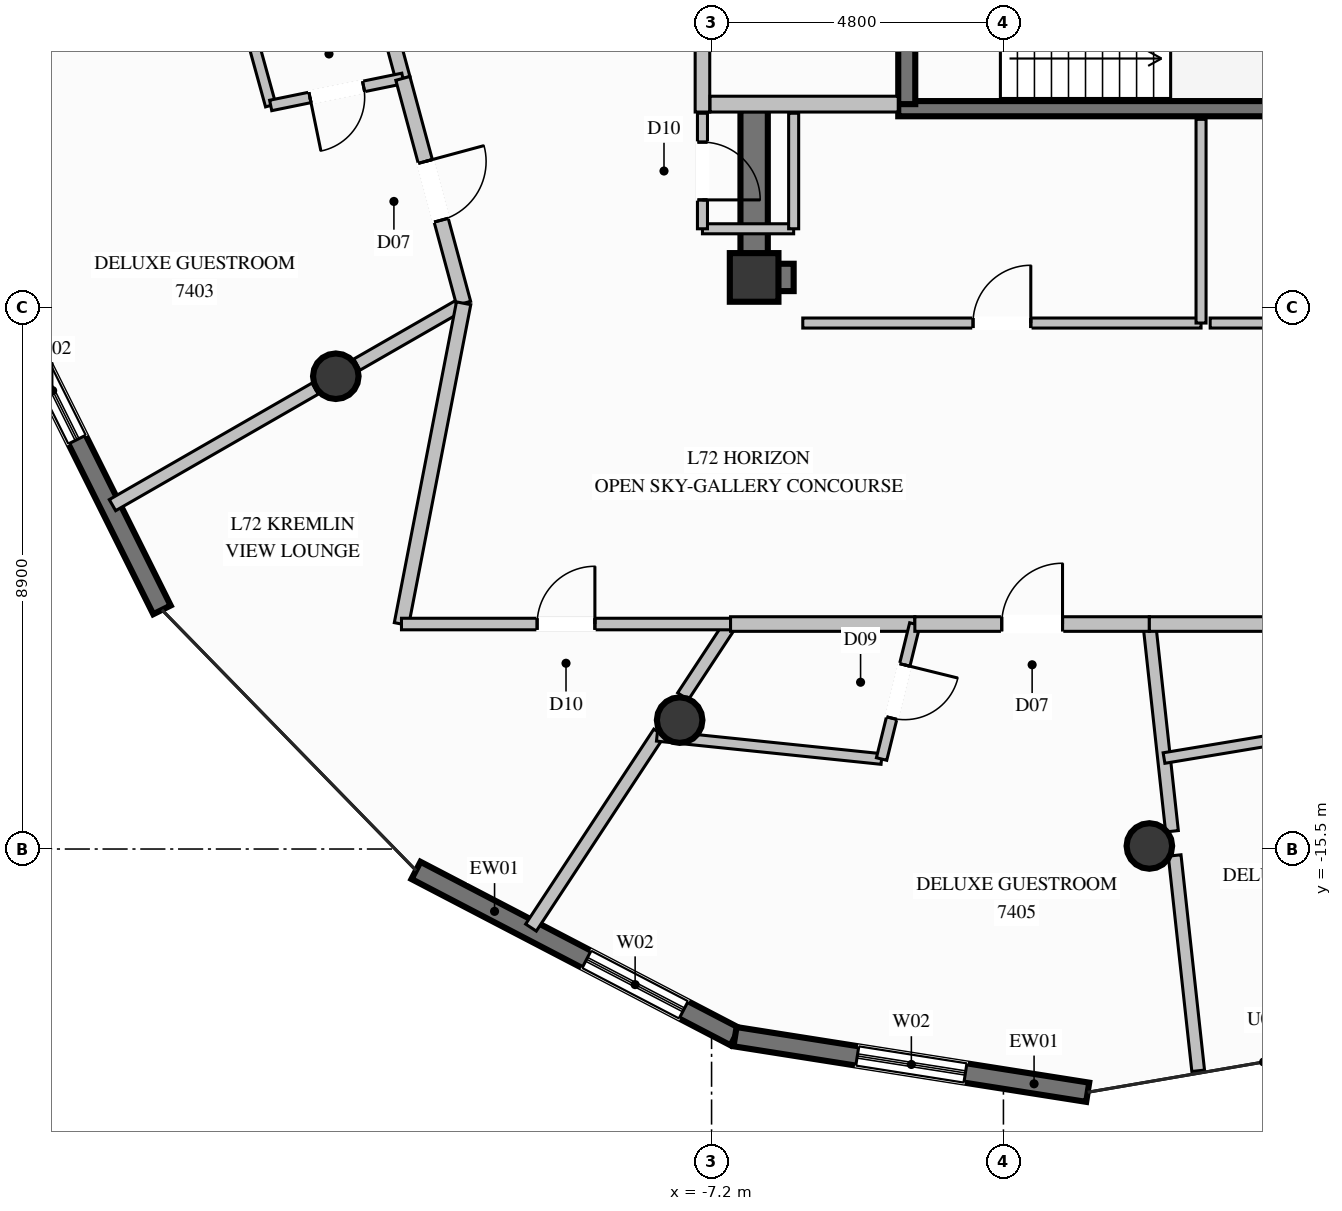
"""IFC4 building model, lengths in metres.
Left out: names, types, materials, properties, quantities, classifications, styles, units other than length and angle.
Written with IfcOpenShell. Run it as: python <this file> out.ifc"""

import sys

from ifc_helpers import new_model, si_unit, direction, frame, frame_2d, origin, origin_2d, place, context, subcontext, project, spatial, rectangle, circle, extrude, element, fill, save


model = new_model("IFC4")
c1 = context("Model", 3, precision=1e-05, world=origin(), true_north=direction((0.0, 1.0)))
c2 = subcontext(c1, "Body", "Model", "MODEL_VIEW")
j1 = project(units=[si_unit("LENGTHUNIT", "METRE"), si_unit("PLANEANGLEUNIT", "RADIAN")], contexts=[c1])
p1 = place(None, origin())
s1 = spatial("IfcSite", under=j1, at=p1, CompositionType="ELEMENT")
p2 = place(p1, origin())
s2 = spatial("IfcBuilding", under=s1, at=p2, CompositionType="ELEMENT")
p3 = place(p2, frame((0.0, 0.0, 278.2)))
s3 = spatial("IfcBuildingStorey", under=s2, at=p3, CompositionType="ELEMENT", Elevation=278.2)
p4 = place(p3, frame((-6.5, -6.1, 0.0), z_axis=(0.0, 0.0, 1.0), x_axis=(1.0, 0.0, 0.0)))
e1 = element("IfcColumn", 1, at=p4, inside=s3, PredefinedType="COLUMN", context=c2, shape_type="SweptSolid", body=[
    extrude(rectangle(XDim=0.8, YDim=0.8, at=origin_2d()), origin(), (0.0, 0.0, 1.0), 3.8),
])
p5 = place(p3, frame((-4.13, -3.325, 0.0), z_axis=(0.0, 0.0, 1.0), x_axis=(1.0, 0.0, 0.0)))
e2 = element("IfcWall", 2, at=p5, inside=s3, PredefinedType="SOLIDWALL", context=c2, shape_type="SweptSolid", body=[
    extrude(rectangle(XDim=8.26, YDim=0.25, at=frame_2d((4.13, 0.0))), origin(), (0.0, 0.0, 1.0), 3.8),
])
p6 = place(p3, frame((-6.275, -6.1, 0.0), z_axis=(0.0, 0.0, 1.0), x_axis=(1.0, 0.0, 0.0)))
e3 = element("IfcWall", 3, at=p6, inside=s3, PredefinedType="SHEAR", context=c2, shape_type="SweptSolid", body=[
    extrude(rectangle(XDim=0.425, YDim=0.45, at=frame_2d((0.212, 0.0))), origin(), (0.0, 0.0, 1.0), 3.8),
])
p7 = place(p3, frame((-6.5, -6.325, 0.0), z_axis=(0.0, 0.0, 1.0), x_axis=(0.0, 1.0, 0.0)))
e4 = element("IfcWall", 4, at=p7, inside=s3, PredefinedType="SHEAR", context=c2, shape_type="SweptSolid", body=[
    extrude(rectangle(XDim=2.975, YDim=0.45, at=frame_2d((1.487, 0.0))), origin(), (0.0, 0.0, 1.0), 3.8),
])
for number, where, z_axis, x_axis in (
    (5, (-13.38, -7.725, 0.0), (0.0, 0.0, 1.0), (1.0, 0.0, 0.0)),
    (6, (-7.725, -13.38, 0.0), (0.0, 0.0, 1.0), (1.0, 0.0, 0.0)),
    (7, (0.0, -15.45, 0.0), (0.0, 0.0, 1.0), (1.0, 0.0, 0.0)),
):
    element("IfcColumn", number, at=place(p3, frame(where, z_axis=z_axis, x_axis=x_axis)), inside=s3, PredefinedType="COLUMN", context=c2, shape_type="SweptSolid", body=[
        extrude(circle(Radius=0.375, at=origin_2d()), origin(), (0.0, 0.0, 1.0), 3.8),
    ])
p8 = place(p3, frame((-16.239, -11.567, 0.0), z_axis=(0.0, 0.0, 1.0), x_axis=(-0.44621303713, 0.894926771024, 0.0)))
e8 = element("IfcWall", 8, at=p8, inside=s3, PredefinedType="SOLIDWALL", context=c2, shape_type="SweptSolid", body=[
    extrude(rectangle(XDim=6.053, YDim=0.32, at=frame_2d((3.026, 0.0))), origin(), (0.0, 0.0, 1.0), 3.57),
])
p9 = place(p8, frame((3.129, 0.0, 0.35)))
e9 = element("IfcOpeningElement", 9, at=p9, cuts=e8, PredefinedType="OPENING", context=c2, shape_type="SweptSolid", body=[
    extrude(rectangle(XDim=1.8, YDim=2.6, at=frame_2d((0.9, 1.3))), frame((0.0, 0.17, 0.0), z_axis=(0.0, -1.0, 0.0), x_axis=(1.0, 0.0, 0.0)), (0.0, 0.0, 1.0), 0.34),
])
p10 = place(p3, frame((-6.814, -18.586, 0.0), z_axis=(0.0, 0.0, 1.0), x_axis=(-0.886842224504, 0.462072363205, 0.0)))
e10 = element("IfcWall", 10, at=p10, inside=s3, PredefinedType="SOLIDWALL", context=c2, shape_type="SweptSolid", body=[
    extrude(rectangle(XDim=5.917, YDim=0.32, at=frame_2d((2.958, 0.0))), origin(), (0.0, 0.0, 1.0), 3.57),
])
p11 = place(p10, frame((0.953, 0.0, 0.35)))
e11 = element("IfcOpeningElement", 11, at=p11, cuts=e10, PredefinedType="OPENING", context=c2, shape_type="SweptSolid", body=[
    extrude(rectangle(XDim=1.8, YDim=2.6, at=frame_2d((0.9, 1.3))), frame((0.0, 0.17, 0.0), z_axis=(0.0, -1.0, 0.0), x_axis=(1.0, 0.0, 0.0)), (0.0, 0.0, 1.0), 0.34),
])
p12 = place(p3, frame((-1.014, -19.5, 0.0), z_axis=(0.0, 0.0, 1.0), x_axis=(-0.987808436163, 0.155674318516, 0.0)))
e12 = element("IfcWall", 12, at=p12, inside=s3, PredefinedType="SOLIDWALL", context=c2, shape_type="SweptSolid", body=[
    extrude(rectangle(XDim=5.872, YDim=0.32, at=frame_2d((2.936, 0.0))), origin(), (0.0, 0.0, 1.0), 3.57),
])
p13 = place(p12, frame((2.036, 0.0, 0.35)))
e13 = element("IfcOpeningElement", 13, at=p13, cuts=e12, PredefinedType="OPENING", context=c2, shape_type="SweptSolid", body=[
    extrude(rectangle(XDim=1.8, YDim=2.6, at=frame_2d((0.9, 1.3))), frame((0.0, 0.17, 0.0), z_axis=(0.0, -1.0, 0.0), x_axis=(1.0, 0.0, 0.0)), (0.0, 0.0, 1.0), 0.34),
])
p14 = place(p3, frame((-3.99, -3.25, 0.0), z_axis=(0.0, 0.0, 1.0), x_axis=(0.0, 1.0, 0.0)))
e14 = element("IfcWall", 14, at=p14, inside=s3, PredefinedType="SOLIDWALL", context=c2, shape_type="SweptSolid", body=[
    extrude(rectangle(XDim=5.46, YDim=0.28, at=frame_2d((2.73, 0.0))), origin(), (0.0, 0.0, 1.0), 3.57),
])
p15 = place(p14, frame((0.937, 0.0, 0.0)))
e15 = element("IfcOpeningElement", 15, at=p15, cuts=e14, PredefinedType="OPENING", context=c2, shape_type="SweptSolid", body=[
    extrude(rectangle(XDim=1.2, YDim=2.2, at=frame_2d((0.6, 1.1))), frame((0.0, 0.15, 0.0), z_axis=(0.0, -1.0, 0.0), x_axis=(1.0, 0.0, 0.0)), (0.0, 0.0, 1.0), 0.3),
])
p16 = place(p3, frame((-7.35, -3.38, 0.0), z_axis=(0.0, 0.0, 1.0), x_axis=(0.0, 1.0, 0.0)))
e16 = element("IfcWall", 16, at=p16, inside=s3, PredefinedType="PARTITIONING", context=c2, shape_type="SweptSolid", body=[
    extrude(rectangle(XDim=5.72, YDim=0.24, at=frame_2d((2.86, 0.0))), origin(), (0.0, 0.0, 1.0), 2.655),
])
p17 = place(p16, frame((1.599, 0.0, 0.0)))
e17 = element("IfcOpeningElement", 17, at=p17, cuts=e16, PredefinedType="OPENING", context=c2, shape_type="SweptSolid", body=[
    extrude(rectangle(XDim=1.15, YDim=2.2, at=frame_2d((0.575, 1.1))), frame((0.0, 0.13, 0.0), z_axis=(0.0, -1.0, 0.0), x_axis=(1.0, 0.0, 0.0)), (0.0, 0.0, 1.0), 0.26),
])
p18 = place(p3, frame((-7.225, -3.25, 0.0), z_axis=(0.0, 0.0, 1.0), x_axis=(1.0, 0.0, 0.0)))
e18 = element("IfcWall", 18, at=p18, inside=s3, PredefinedType="PARTITIONING", context=c2, shape_type="SweptSolid", body=[
    extrude(rectangle(XDim=3.095, YDim=0.26, at=frame_2d((1.548, 0.0))), origin(), (0.0, 0.0, 1.0), 3.57),
])
p19 = place(p3, frame((-7.35, -5.3, 0.0), z_axis=(0.0, 0.0, 1.0), x_axis=(1.0, 0.0, 0.0)))
e19 = element("IfcWall", 19, at=p19, inside=s3, PredefinedType="PARTITIONING", context=c2, shape_type="SweptSolid", body=[
    extrude(rectangle(XDim=1.5, YDim=0.165, at=frame_2d((0.75, 0.0))), origin(), (0.0, 0.0, 1.0), 2.655),
])
p20 = place(p3, frame((-5.85, -5.3, 0.0), z_axis=(0.0, 0.0, 1.0), x_axis=(0.0, 1.0, 0.0)))
e20 = element("IfcWall", 20, at=p20, inside=s3, PredefinedType="PARTITIONING", context=c2, shape_type="SweptSolid", body=[
    extrude(rectangle(XDim=1.9, YDim=0.165, at=frame_2d((0.95, 0.0))), origin(), (0.0, 0.0, 1.0), 2.655),
])
p21 = place(p3, frame((-7.35, -3.4, 0.0), z_axis=(0.0, 0.0, 1.0), x_axis=(0.0, -1.0, 0.0)))
e21 = element("IfcWall", 21, at=p21, inside=s3, PredefinedType="PARTITIONING", context=c2, shape_type="SweptSolid", body=[
    extrude(rectangle(XDim=1.9, YDim=0.165, at=frame_2d((0.95, 0.0))), origin(), (0.0, 0.0, 1.0), 3.57),
])
p22 = place(p21, frame((0.475, 0.0, 0.0)))
e22 = element("IfcOpeningElement", 22, at=p22, cuts=e21, PredefinedType="OPENING", context=c2, shape_type="SweptSolid", body=[
    extrude(rectangle(XDim=0.95, YDim=2.1, at=frame_2d((0.475, 1.05))), frame((0.0, 0.093, 0.0), z_axis=(0.0, -1.0, 0.0), x_axis=(1.0, 0.0, 0.0)), (0.0, 0.0, 1.0), 0.185),
])
p23 = place(p3, frame((-5.7, -6.85, 0.0), z_axis=(0.0, 0.0, 1.0), x_axis=(1.0, 0.0, 0.0)))
e23 = element("IfcWall", 23, at=p23, inside=s3, PredefinedType="PARTITIONING", context=c2, shape_type="SweptSolid", body=[
    extrude(rectangle(XDim=6.55, YDim=0.165, at=frame_2d((3.275, 0.0))), origin(), (0.0, 0.0, 1.0), 2.655),
])
p24 = place(p23, frame((2.8, 0.0, 0.0)))
e24 = element("IfcOpeningElement", 24, at=p24, cuts=e23, PredefinedType="OPENING", context=c2, shape_type="SweptSolid", body=[
    extrude(rectangle(XDim=0.95, YDim=2.1, at=frame_2d((0.475, 1.05))), frame((0.0, 0.093, 0.0), z_axis=(0.0, -1.0, 0.0), x_axis=(1.0, 0.0, 0.0)), (0.0, 0.0, 1.0), 0.185),
])
p25 = place(p3, frame((0.85, -6.85, 0.0), z_axis=(0.0, 0.0, 1.0), x_axis=(0.0, 1.0, 0.0)))
e25 = element("IfcWall", 25, at=p25, inside=s3, PredefinedType="PARTITIONING", context=c2, shape_type="SweptSolid", body=[
    extrude(rectangle(XDim=3.35, YDim=0.165, at=frame_2d((1.675, 0.0))), origin(), (0.0, 0.0, 1.0), 3.57),
])
p26 = place(p3, frame((1.0, -6.85, 0.0), z_axis=(0.0, 0.0, 1.0), x_axis=(1.0, 0.0, 0.0)))
e26 = element("IfcWall", 26, at=p26, inside=s3, PredefinedType="PARTITIONING", context=c2, shape_type="SweptSolid", body=[
    extrude(rectangle(XDim=2.95, YDim=0.165, at=frame_2d((1.475, 0.0))), origin(), (0.0, 0.0, 1.0), 2.655),
])
p27 = place(p26, frame((0.95, 0.0, 0.0)))
e27 = element("IfcOpeningElement", 27, at=p27, cuts=e26, PredefinedType="OPENING", context=c2, shape_type="SweptSolid", body=[
    extrude(rectangle(XDim=1.05, YDim=2.15, at=frame_2d((0.525, 1.075))), frame((0.0, 0.093, 0.0), z_axis=(0.0, -1.0, 0.0), x_axis=(1.0, 0.0, 0.0)), (0.0, 0.0, 1.0), 0.185),
])
p28 = place(p3, frame((-11.278, -6.525, 0.0), z_axis=(0.0, 0.0, 1.0), x_axis=(-0.86703130414, -0.498253667966, 0.0)))
e28 = element("IfcWall", 28, at=p28, inside=s3, PredefinedType="PARTITIONING", context=c2, shape_type="SweptSolid", body=[
    extrude(rectangle(XDim=2.025, YDim=0.21, at=frame_2d((1.013, 0.0))), origin(), (0.0, 0.0, 1.0), 3.011),
])
p29 = place(p3, frame((-13.719, -7.928, 0.0), z_axis=(0.0, 0.0, 1.0), x_axis=(-0.866911789482, -0.498461582529, 0.0)))
e29 = element("IfcWall", 29, at=p29, inside=s3, PredefinedType="PARTITIONING", context=c2, shape_type="SweptSolid", body=[
    extrude(rectangle(XDim=3.846, YDim=0.21, at=frame_2d((1.923, 0.0))), origin(), (0.0, 0.0, 1.0), 3.57),
])
p30 = place(p3, frame((-13.0, -0.15, 0.0), z_axis=(0.0, 0.0, 1.0), x_axis=(0.260702780503, -0.965419111183, 0.0)))
e30 = element("IfcWall", 30, at=p30, inside=s3, PredefinedType="PARTITIONING", context=c2, shape_type="SweptSolid", body=[
    extrude(rectangle(XDim=2.773, YDim=0.24, at=frame_2d((1.386, 0.0))), origin(), (0.0, 0.0, 1.0), 3.57),
])
p31 = place(p3, frame((-15.326, -0.099, 0.0), z_axis=(0.0, 0.0, 1.0), x_axis=(0.265852934402, -0.964013598073, 0.0)))
e31 = element("IfcWall", 31, at=p31, inside=s3, PredefinedType="PLUMBINGWALL", context=c2, shape_type="SweptSolid", body=[
    extrude(rectangle(XDim=3.291, YDim=0.175, at=frame_2d((1.646, 0.0))), origin(), (0.0, 0.0, 1.0), 3.137),
])
p32 = place(p3, frame((-12.277, -2.827, 0.0), z_axis=(0.0, 0.0, 1.0), x_axis=(-0.979677603326, -0.200578646773, 0.0)))
e32 = element("IfcWall", 32, at=p32, inside=s3, PredefinedType="PLUMBINGWALL", context=c2, shape_type="SweptSolid", body=[
    extrude(rectangle(XDim=2.219, YDim=0.175, at=frame_2d((1.109, 0.0))), origin(), (0.0, 0.0, 1.0), 3.57),
])
p33 = place(p32, frame((0.66, 0.0, 0.0)))
e33 = element("IfcOpeningElement", 33, at=p33, cuts=e32, PredefinedType="OPENING", context=c2, shape_type="SweptSolid", body=[
    extrude(rectangle(XDim=0.9, YDim=2.1, at=frame_2d((0.45, 1.05))), frame((0.0, 0.098, 0.0), z_axis=(0.0, -1.0, 0.0), x_axis=(1.0, 0.0, 0.0)), (0.0, 0.0, 1.0), 0.195),
])
p34 = place(p3, frame((-12.277, -2.827, 0.0), z_axis=(0.0, 0.0, 1.0), x_axis=(0.260803073576, -0.965392022348, 0.0)))
e34 = element("IfcWall", 34, at=p34, inside=s3, PredefinedType="PARTITIONING", context=c2, shape_type="SweptSolid", body=[
    extrude(rectangle(XDim=3.831, YDim=0.24, at=frame_2d((1.915, 0.0))), origin(), (0.0, 0.0, 1.0), 3.57),
])
p35 = place(p34, frame((1.415, 0.0, 0.0)))
e35 = element("IfcOpeningElement", 35, at=p35, cuts=e34, PredefinedType="OPENING", context=c2, shape_type="SweptSolid", body=[
    extrude(rectangle(XDim=1.0, YDim=2.2, at=frame_2d((0.5, 1.1))), frame((0.0, 0.13, 0.0), z_axis=(0.0, -1.0, 0.0), x_axis=(1.0, 0.0, 0.0)), (0.0, 0.0, 1.0), 0.26),
])
p36 = place(p3, frame((-6.888, -11.8, 0.0), z_axis=(0.0, 0.0, 1.0), x_axis=(-0.549503063575, -0.835491701408, 0.0)))
e36 = element("IfcWall", 36, at=p36, inside=s3, PredefinedType="PARTITIONING", context=c2, shape_type="SweptSolid", body=[
    extrude(rectangle(XDim=1.423, YDim=0.21, at=frame_2d((0.711, 0.0))), origin(), (0.0, 0.0, 1.0), 3.011),
])
p37 = place(p3, frame((-8.062, -13.586, 0.0), z_axis=(0.0, 0.0, 1.0), x_axis=(-0.549373402242, -0.835576965282, 0.0)))
e37 = element("IfcWall", 37, at=p37, inside=s3, PredefinedType="PARTITIONING", context=c2, shape_type="SweptSolid", body=[
    extrude(rectangle(XDim=3.837, YDim=0.21, at=frame_2d((1.918, 0.0))), origin(), (0.0, 0.0, 1.0), 3.57),
])
p38 = place(p3, frame((-11.278, -6.525, 0.0), z_axis=(0.0, 0.0, 1.0), x_axis=(-0.190197086903, -0.981745928504, 0.0)))
e38 = element("IfcWall", 38, at=p38, inside=s3, PredefinedType="PARTITIONING", context=c2, shape_type="SweptSolid", body=[
    extrude(rectangle(XDim=5.373, YDim=0.24, at=frame_2d((2.687, 0.0))), origin(), (0.0, 0.0, 1.0), 3.57),
])
p39 = place(p3, frame((-12.3, -11.8, 0.0), z_axis=(0.0, 0.0, 1.0), x_axis=(1.0, 0.0, 0.0)))
e39 = element("IfcWall", 39, at=p39, inside=s3, PredefinedType="PARTITIONING", context=c2, shape_type="SweptSolid", body=[
    extrude(rectangle(XDim=5.412, YDim=0.19, at=frame_2d((2.706, 0.0))), origin(), (0.0, 0.0, 1.0), 3.57),
])
p40 = place(p39, frame((2.231, 0.0, 0.0)))
e40 = element("IfcOpeningElement", 40, at=p40, cuts=e39, PredefinedType="OPENING", context=c2, shape_type="SweptSolid", body=[
    extrude(rectangle(XDim=0.95, YDim=2.1, at=frame_2d((0.475, 1.05))), frame((0.0, 0.105, 0.0), z_axis=(0.0, -1.0, 0.0), x_axis=(1.0, 0.0, 0.0)), (0.0, 0.0, 1.0), 0.21),
])
p41 = place(p3, frame((-6.888, -11.8, 0.0), z_axis=(0.0, 0.0, 1.0), x_axis=(1.0, 0.0, 0.0)))
e41 = element("IfcWall", 41, at=p41, inside=s3, PredefinedType="PARTITIONING", context=c2, shape_type="SweptSolid", body=[
    extrude(rectangle(XDim=3.031, YDim=0.24, at=frame_2d((1.516, 0.0))), origin(), (0.0, 0.0, 1.0), 3.57),
])
p42 = place(p3, frame((-8.097, -13.638, 0.0), z_axis=(0.0, 0.0, 1.0), x_axis=(0.994690169037, -0.102914856178, 0.0)))
e42 = element("IfcWall", 42, at=p42, inside=s3, PredefinedType="PLUMBINGWALL", context=c2, shape_type="SweptSolid", body=[
    extrude(rectangle(XDim=3.713, YDim=0.175, at=frame_2d((1.856, 0.0))), origin(), (0.0, 0.0, 1.0), 3.137),
])
p43 = place(p3, frame((-3.857, -11.8, 0.0), z_axis=(0.0, 0.0, 1.0), x_axis=(-0.239293195121, -0.970947355302, 0.0)))
e43 = element("IfcWall", 43, at=p43, inside=s3, PredefinedType="PLUMBINGWALL", context=c2, shape_type="SweptSolid", body=[
    extrude(rectangle(XDim=2.286, YDim=0.175, at=frame_2d((1.143, 0.0))), origin(), (0.0, 0.0, 1.0), 3.57),
])
p44 = place(p43, frame((0.693, 0.0, 0.0)))
e44 = element("IfcOpeningElement", 44, at=p44, cuts=e43, PredefinedType="OPENING", context=c2, shape_type="SweptSolid", body=[
    extrude(rectangle(XDim=0.9, YDim=2.1, at=frame_2d((0.45, 1.05))), frame((0.0, 0.098, 0.0), z_axis=(0.0, -1.0, 0.0), x_axis=(1.0, 0.0, 0.0)), (0.0, 0.0, 1.0), 0.195),
])
p45 = place(p3, frame((0.0, -11.8, 0.0), z_axis=(0.0, 0.0, 1.0), x_axis=(0.10853196296, -0.994092959947, 0.0)))
e45 = element("IfcWall", 45, at=p45, inside=s3, PredefinedType="PARTITIONING", context=c2, shape_type="SweptSolid", body=[
    extrude(rectangle(XDim=3.428, YDim=0.21, at=frame_2d((1.714, 0.0))), origin(), (0.0, 0.0, 1.0), 3.57),
])
p46 = place(p3, frame((0.416, -15.606, 0.0), z_axis=(0.0, 0.0, 1.0), x_axis=(0.108633464481, -0.994081873084, 0.0)))
e46 = element("IfcWall", 46, at=p46, inside=s3, PredefinedType="PARTITIONING", context=c2, shape_type="SweptSolid", body=[
    extrude(rectangle(XDim=3.562, YDim=0.21, at=frame_2d((1.781, 0.0))), origin(), (0.0, 0.0, 1.0), 3.57),
])
p47 = place(p3, frame((-3.857, -11.8, 0.0), z_axis=(0.0, 0.0, 1.0), x_axis=(1.0, 0.0, 0.0)))
e47 = element("IfcWall", 47, at=p47, inside=s3, PredefinedType="PARTITIONING", context=c2, shape_type="SweptSolid", body=[
    extrude(rectangle(XDim=3.857, YDim=0.24, at=frame_2d((1.928, 0.0))), origin(), (0.0, 0.0, 1.0), 3.57),
])
p48 = place(p47, frame((1.429, 0.0, 0.0)))
e48 = element("IfcOpeningElement", 48, at=p48, cuts=e47, PredefinedType="OPENING", context=c2, shape_type="SweptSolid", body=[
    extrude(rectangle(XDim=1.0, YDim=2.2, at=frame_2d((0.5, 1.1))), frame((0.0, 0.13, 0.0), z_axis=(0.0, -1.0, 0.0), x_axis=(1.0, 0.0, 0.0)), (0.0, 0.0, 1.0), 0.26),
])
p49 = place(p3, frame((0.0, -11.8, 0.0), z_axis=(0.0, 0.0, 1.0), x_axis=(1.0, 0.0, 0.0)))
e49 = element("IfcWall", 49, at=p49, inside=s3, PredefinedType="PARTITIONING", context=c2, shape_type="SweptSolid", body=[
    extrude(rectangle(XDim=3.031, YDim=0.24, at=frame_2d((1.516, 0.0))), origin(), (0.0, 0.0, 1.0), 3.57),
])
p50 = place(p3, frame((0.241, -14.004, 0.0), z_axis=(0.0, 0.0, 1.0), x_axis=(0.986431772805, 0.164171732042, 0.0)))
e50 = element("IfcWall", 50, at=p50, inside=s3, PredefinedType="PLUMBINGWALL", context=c2, shape_type="SweptSolid", body=[
    extrude(rectangle(XDim=3.484, YDim=0.175, at=frame_2d((1.742, 0.0))), origin(), (0.0, 0.0, 1.0), 3.57),
])
p51 = place(p9, origin())
e51 = element("IfcWindow", 51, at=p51, inside=s3, PartitioningType="SINGLE_PANEL", PredefinedType="WINDOW", context=c2, shape_type="SweptSolid", body=[
    extrude(rectangle(XDim=1.8, YDim=2.6, at=frame_2d((0.9, 1.3))), frame((0.0, 0.03, 0.0), z_axis=(0.0, -1.0, 0.0), x_axis=(1.0, 0.0, 0.0)), (0.0, 0.0, 1.0), 0.06),
])
fill(e9, e51)
p52 = place(p11, origin())
e52 = element("IfcWindow", 52, at=p52, inside=s3, PartitioningType="SINGLE_PANEL", PredefinedType="WINDOW", context=c2, shape_type="SweptSolid", body=[
    extrude(rectangle(XDim=1.8, YDim=2.6, at=frame_2d((0.9, 1.3))), frame((0.0, 0.03, 0.0), z_axis=(0.0, -1.0, 0.0), x_axis=(1.0, 0.0, 0.0)), (0.0, 0.0, 1.0), 0.06),
])
fill(e11, e52)
p53 = place(p13, origin())
e53 = element("IfcWindow", 53, at=p53, inside=s3, PartitioningType="SINGLE_PANEL", PredefinedType="WINDOW", context=c2, shape_type="SweptSolid", body=[
    extrude(rectangle(XDim=1.8, YDim=2.6, at=frame_2d((0.9, 1.3))), frame((0.0, 0.03, 0.0), z_axis=(0.0, -1.0, 0.0), x_axis=(1.0, 0.0, 0.0)), (0.0, 0.0, 1.0), 0.06),
])
fill(e13, e53)
p54 = place(p22, origin())
e54 = element("IfcDoor", 54, at=p54, inside=s3, OperationType="SINGLE_SWING_RIGHT", PredefinedType="DOOR", context=c2, shape_type="SweptSolid", body=[
    extrude(rectangle(XDim=0.95, YDim=2.1, at=frame_2d((0.475, 1.05))), frame((0.0, 0.025, 0.0), z_axis=(0.0, -1.0, 0.0), x_axis=(1.0, 0.0, 0.0)), (0.0, 0.0, 1.0), 0.05),
])
fill(e22, e54)
p55 = place(p24, origin())
e55 = element("IfcDoor", 55, at=p55, inside=s3, OperationType="SINGLE_SWING_RIGHT", PredefinedType="DOOR", context=c2, shape_type="SweptSolid", body=[
    extrude(rectangle(XDim=0.95, YDim=2.1, at=frame_2d((0.475, 1.05))), frame((0.0, 0.025, 0.0), z_axis=(0.0, -1.0, 0.0), x_axis=(1.0, 0.0, 0.0)), (0.0, 0.0, 1.0), 0.05),
])
fill(e24, e55)
p56 = place(p33, origin())
e56 = element("IfcDoor", 56, at=p56, inside=s3, OperationType="SINGLE_SWING_RIGHT", PredefinedType="DOOR", context=c2, shape_type="SweptSolid", body=[
    extrude(rectangle(XDim=0.9, YDim=2.1, at=frame_2d((0.45, 1.05))), frame((0.0, 0.025, 0.0), z_axis=(0.0, -1.0, 0.0), x_axis=(1.0, 0.0, 0.0)), (0.0, 0.0, 1.0), 0.05),
])
fill(e33, e56)
p57 = place(p35, origin())
e57 = element("IfcDoor", 57, at=p57, inside=s3, OperationType="SINGLE_SWING_LEFT", PredefinedType="DOOR", context=c2, shape_type="SweptSolid", body=[
    extrude(rectangle(XDim=1.0, YDim=2.2, at=frame_2d((0.5, 1.1))), frame((0.0, 0.025, 0.0), z_axis=(0.0, -1.0, 0.0), x_axis=(1.0, 0.0, 0.0)), (0.0, 0.0, 1.0), 0.05),
])
fill(e35, e57)
p58 = place(p40, origin())
e58 = element("IfcDoor", 58, at=p58, inside=s3, OperationType="SINGLE_SWING_RIGHT", PredefinedType="DOOR", context=c2, shape_type="SweptSolid", body=[
    extrude(rectangle(XDim=0.95, YDim=2.1, at=frame_2d((0.475, 1.05))), frame((0.0, 0.025, 0.0), z_axis=(0.0, -1.0, 0.0), x_axis=(1.0, 0.0, 0.0)), (0.0, 0.0, 1.0), 0.05),
])
fill(e40, e58)
p59 = place(p44, origin())
e59 = element("IfcDoor", 59, at=p59, inside=s3, OperationType="SINGLE_SWING_LEFT", PredefinedType="DOOR", context=c2, shape_type="SweptSolid", body=[
    extrude(rectangle(XDim=0.9, YDim=2.1, at=frame_2d((0.45, 1.05))), frame((0.0, 0.025, 0.0), z_axis=(0.0, -1.0, 0.0), x_axis=(1.0, 0.0, 0.0)), (0.0, 0.0, 1.0), 0.05),
])
fill(e44, e59)
p60 = place(p48, origin())
e60 = element("IfcDoor", 60, at=p60, inside=s3, OperationType="SINGLE_SWING_RIGHT", PredefinedType="DOOR", context=c2, shape_type="SweptSolid", body=[
    extrude(rectangle(XDim=1.0, YDim=2.2, at=frame_2d((0.5, 1.1))), frame((0.0, 0.025, 0.0), z_axis=(0.0, -1.0, 0.0), x_axis=(1.0, 0.0, 0.0)), (0.0, 0.0, 1.0), 0.05),
])
fill(e48, e60)
save(model, sys.argv[1])
